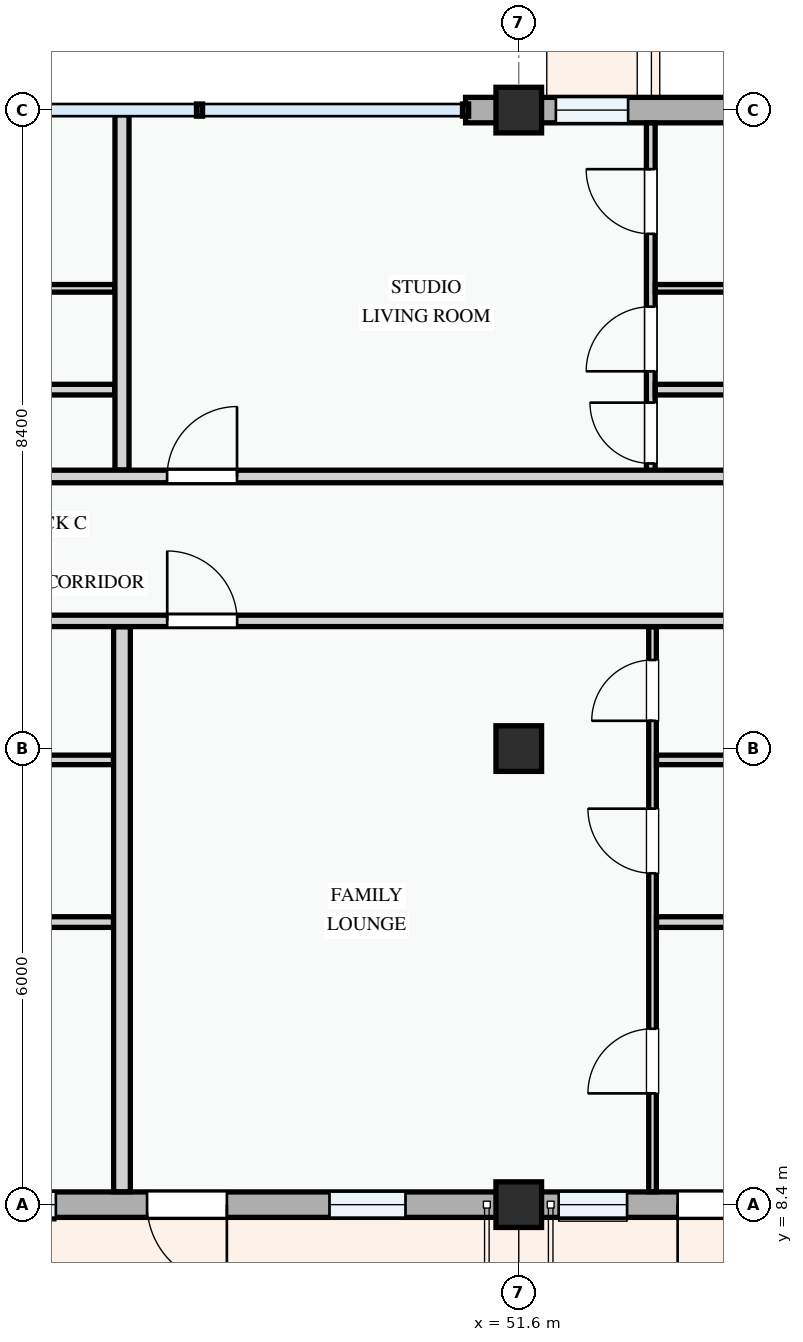
"""IFC4 building model, lengths in metres.
Left out: names, types, materials, properties, quantities, classifications, styles, units other than length and angle.
Written with IfcOpenShell. Run it as: python <this file> out.ifc"""

import sys

from ifc_helpers import new_model, si_unit, direction, frame, frame_2d, origin, origin_2d, place, context, subcontext, project, spatial, rectangle, extrude, element, fill, save


model = new_model("IFC4")
c1 = context("Model", 3, precision=1e-05, world=origin(), true_north=direction((0.0, 1.0)))
c2 = subcontext(c1, "Body", "Model", "MODEL_VIEW")
j1 = project(units=[si_unit("LENGTHUNIT", "METRE"), si_unit("PLANEANGLEUNIT", "RADIAN")], contexts=[c1])
p1 = place(None, origin())
s1 = spatial("IfcSite", under=j1, at=p1, CompositionType="ELEMENT")
p2 = place(p1, origin())
s2 = spatial("IfcBuilding", under=s1, at=p2, CompositionType="ELEMENT")
p3 = place(p2, frame((0.0, 0.0, 11.4)))
s3 = spatial("IfcBuildingStorey", under=s2, at=p3, CompositionType="ELEMENT", Elevation=11.4)
for number, where, z_axis, x_axis in (
    (1, (51.6, 8.4, 0.0), (0.0, 0.0, 1.0), (1.0, 0.0, 0.0)),
    (2, (51.6, 14.4, 0.0), (0.0, 0.0, 1.0), (1.0, 0.0, 0.0)),
    (3, (51.6, 22.8, 0.0), (0.0, 0.0, 1.0), (1.0, 0.0, 0.0)),
):
    element("IfcColumn", number, at=place(p3, frame(where, z_axis=z_axis, x_axis=x_axis)), inside=s3, PredefinedType="COLUMN", context=c2, shape_type="SweptSolid", body=[
        extrude(rectangle(XDim=0.6, YDim=0.6, at=origin_2d()), origin(), (0.0, 0.0, 1.0), 3.3),
    ])
p4 = place(p3, frame((43.2, 8.4, 0.0), z_axis=(0.0, 0.0, 1.0), x_axis=(1.0, 0.0, 0.0)))
e4 = element("IfcWall", 4, at=p4, inside=s3, PredefinedType="STANDARD", context=c2, shape_type="SweptSolid", body=[
    extrude(rectangle(XDim=8.4, YDim=0.335, at=frame_2d((4.2, 0.0))), origin(), (0.0, 0.0, 1.0), 2.375),
])
p5 = place(p4, frame((3.51, 0.0, 0.0)))
e5 = element("IfcOpeningElement", 5, at=p5, cuts=e4, PredefinedType="OPENING", context=c2, shape_type="SweptSolid", body=[
    extrude(rectangle(XDim=1.05, YDim=2.15, at=frame_2d((0.525, 1.075))), frame((0.0, 0.177, 0.0), z_axis=(0.0, -1.0, 0.0), x_axis=(1.0, 0.0, 0.0)), (0.0, 0.0, 1.0), 0.355),
])
p6 = place(p4, frame((1.06, 0.0, 0.78)))
e6 = element("IfcOpeningElement", 6, at=p6, cuts=e4, PredefinedType="OPENING", context=c2, shape_type="SweptSolid", body=[
    extrude(rectangle(XDim=1.25, YDim=1.3, at=frame_2d((0.625, 0.65))), frame((0.0, 0.177, 0.0), z_axis=(0.0, -1.0, 0.0), x_axis=(1.0, 0.0, 0.0)), (0.0, 0.0, 1.0), 0.355),
])
p7 = place(p4, frame((5.91, 0.0, 0.78)))
e7 = element("IfcOpeningElement", 7, at=p7, cuts=e4, PredefinedType="OPENING", context=c2, shape_type="SweptSolid", body=[
    extrude(rectangle(XDim=1.0, YDim=1.25, at=frame_2d((0.5, 0.625))), frame((0.0, 0.177, 0.0), z_axis=(0.0, -1.0, 0.0), x_axis=(1.0, 0.0, 0.0)), (0.0, 0.0, 1.0), 0.355),
])
p8 = place(p3, frame((51.6, 8.4, 0.0), z_axis=(0.0, 0.0, 1.0), x_axis=(1.0, 0.0, 0.0)))
e8 = element("IfcWall", 8, at=p8, inside=s3, PredefinedType="STANDARD", context=c2, shape_type="SweptSolid", body=[
    extrude(rectangle(XDim=6.0, YDim=0.335, at=frame_2d((3.0, 0.0))), origin(), (0.0, 0.0, 1.0), 2.475),
])
p9 = place(p8, frame((2.09, 0.0, 0.0)))
e9 = element("IfcOpeningElement", 9, at=p9, cuts=e8, PredefinedType="OPENING", context=c2, shape_type="SweptSolid", body=[
    extrude(rectangle(XDim=1.1, YDim=2.15, at=frame_2d((0.55, 1.075))), frame((0.0, 0.177, 0.0), z_axis=(0.0, -1.0, 0.0), x_axis=(1.0, 0.0, 0.0)), (0.0, 0.0, 1.0), 0.355),
])
p10 = place(p8, frame((0.525, 0.0, 0.78)))
e10 = element("IfcOpeningElement", 10, at=p10, cuts=e8, PredefinedType="OPENING", context=c2, shape_type="SweptSolid", body=[
    extrude(rectangle(XDim=0.9, YDim=1.2, at=frame_2d((0.45, 0.6))), frame((0.0, 0.177, 0.0), z_axis=(0.0, -1.0, 0.0), x_axis=(1.0, 0.0, 0.0)), (0.0, 0.0, 1.0), 0.355),
])
p11 = place(p8, frame((3.835, 0.0, 0.78)))
e11 = element("IfcOpeningElement", 11, at=p11, cuts=e8, PredefinedType="OPENING", context=c2, shape_type="SweptSolid", body=[
    extrude(rectangle(XDim=1.38, YDim=1.48, at=frame_2d((0.69, 0.74))), frame((0.0, 0.177, 0.0), z_axis=(0.0, -1.0, 0.0), x_axis=(1.0, 0.0, 0.0)), (0.0, 0.0, 1.0), 0.355),
])
p12 = place(p3, frame((57.6, 22.8, 0.0), z_axis=(0.0, 0.0, 1.0), x_axis=(-1.0, 0.0, 0.0)))
e12 = element("IfcWall", 12, at=p12, inside=s3, PredefinedType="STANDARD", context=c2, shape_type="SweptSolid", body=[
    extrude(rectangle(XDim=6.0, YDim=0.335, at=frame_2d((3.0, 0.0))), origin(), (0.0, 0.0, 1.0), 2.475),
])
p13 = place(p12, frame((1.467, 0.0, 0.78)))
e13 = element("IfcOpeningElement", 13, at=p13, cuts=e12, PredefinedType="OPENING", context=c2, shape_type="SweptSolid", body=[
    extrude(rectangle(XDim=1.52, YDim=1.42, at=frame_2d((0.76, 0.71))), frame((0.0, 0.177, 0.0), z_axis=(0.0, -1.0, 0.0), x_axis=(1.0, 0.0, 0.0)), (0.0, 0.0, 1.0), 0.355),
])
p14 = place(p12, frame((4.562, 0.0, 0.78)))
e14 = element("IfcOpeningElement", 14, at=p14, cuts=e12, PredefinedType="OPENING", context=c2, shape_type="SweptSolid", body=[
    extrude(rectangle(XDim=0.95, YDim=1.15, at=frame_2d((0.475, 0.575))), frame((0.0, 0.177, 0.0), z_axis=(0.0, -1.0, 0.0), x_axis=(1.0, 0.0, 0.0)), (0.0, 0.0, 1.0), 0.355),
])
p15 = place(p3, frame((51.6, 22.8, 0.0), z_axis=(0.0, 0.0, 1.0), x_axis=(-1.0, 0.0, 0.0)))
e15 = element("IfcWall", 15, at=p15, inside=s3, PredefinedType="STANDARD", context=c2, shape_type="SweptSolid", body=[
    extrude(rectangle(XDim=0.7, YDim=0.335, at=frame_2d((0.35, 0.0))), origin(), (0.0, 0.0, 1.0), 2.375),
])
p16 = place(p3, frame((40.502, 12.118, 0.0), z_axis=(0.0, 0.0, 1.0), x_axis=(1.0, 0.0, 0.0)))
e16 = element("IfcWall", 16, at=p16, inside=s3, PredefinedType="PARTITIONING", context=c2, shape_type="SweptSolid", body=[
    extrude(rectangle(XDim=5.766, YDim=0.14, at=frame_2d((2.883, 0.0))), origin(), (0.0, 0.0, 1.0), 3.0),
])
p17 = place(p3, frame((40.502, 14.251, 0.0), z_axis=(0.0, 0.0, 1.0), x_axis=(1.0, 0.0, 0.0)))
e17 = element("IfcWall", 17, at=p17, inside=s3, PredefinedType="PARTITIONING", context=c2, shape_type="SweptSolid", body=[
    extrude(rectangle(XDim=5.766, YDim=0.125, at=frame_2d((2.883, 0.0))), origin(), (0.0, 0.0, 1.0), 2.375),
])
p18 = place(p3, frame((40.272, 20.455, 0.0), z_axis=(0.0, 0.0, 1.0), x_axis=(1.0, 0.0, 0.0)))
e18 = element("IfcWall", 18, at=p18, inside=s3, PredefinedType="PARTITIONING", context=c2, shape_type="SweptSolid", body=[
    extrude(rectangle(XDim=6.013, YDim=0.1, at=frame_2d((3.007, 0.0))), origin(), (0.0, 0.0, 1.0), 3.0),
])
p19 = place(p3, frame((40.272, 19.122, 0.0), z_axis=(0.0, 0.0, 1.0), x_axis=(1.0, 0.0, 0.0)))
e19 = element("IfcWall", 19, at=p19, inside=s3, PredefinedType="PARTITIONING", context=c2, shape_type="SweptSolid", body=[
    extrude(rectangle(XDim=6.013, YDim=0.14, at=frame_2d((3.007, 0.0))), origin(), (0.0, 0.0, 1.0), 3.0),
])
p20 = place(p3, frame((53.36, 8.57, 0.0), z_axis=(0.0, 0.0, 1.0), x_axis=(0.0, 1.0, 0.0)))
e20 = element("IfcWall", 20, at=p20, inside=s3, PredefinedType="PARTITIONING", context=c2, shape_type="SweptSolid", body=[
    extrude(rectangle(XDim=7.433, YDim=0.1, at=frame_2d((3.717, 0.0))), origin(), (0.0, 0.0, 1.0), 3.0),
])
p21 = place(p20, frame((1.294, 0.0, 0.0)))
e21 = element("IfcOpeningElement", 21, at=p21, cuts=e20, PredefinedType="OPENING", context=c2, shape_type="SweptSolid", body=[
    extrude(rectangle(XDim=0.85, YDim=2.1, at=frame_2d((0.425, 1.05))), frame((0.0, 0.06, 0.0), z_axis=(0.0, -1.0, 0.0), x_axis=(1.0, 0.0, 0.0)), (0.0, 0.0, 1.0), 0.12),
])
p22 = place(p20, frame((4.19, 0.0, 0.0)))
e22 = element("IfcOpeningElement", 22, at=p22, cuts=e20, PredefinedType="OPENING", context=c2, shape_type="SweptSolid", body=[
    extrude(rectangle(XDim=0.85, YDim=2.1, at=frame_2d((0.425, 1.05))), frame((0.0, 0.06, 0.0), z_axis=(0.0, -1.0, 0.0), x_axis=(1.0, 0.0, 0.0)), (0.0, 0.0, 1.0), 0.12),
])
p23 = place(p20, frame((6.196, 0.0, 0.0)))
e23 = element("IfcOpeningElement", 23, at=p23, cuts=e20, PredefinedType="OPENING", context=c2, shape_type="SweptSolid", body=[
    extrude(rectangle(XDim=0.8, YDim=2.1, at=frame_2d((0.4, 1.05))), frame((0.0, 0.06, 0.0), z_axis=(0.0, -1.0, 0.0), x_axis=(1.0, 0.0, 0.0)), (0.0, 0.0, 1.0), 0.12),
])
p24 = place(p3, frame((53.412, 12.118, 0.0), z_axis=(0.0, 0.0, 1.0), x_axis=(1.0, 0.0, 0.0)))
e24 = element("IfcWall", 24, at=p24, inside=s3, PredefinedType="PARTITIONING", context=c2, shape_type="SweptSolid", body=[
    extrude(rectangle(XDim=4.018, YDim=0.14, at=frame_2d((2.009, 0.0))), origin(), (0.0, 0.0, 1.0), 3.0),
])
p25 = place(p3, frame((53.412, 14.251, 0.0), z_axis=(0.0, 0.0, 1.0), x_axis=(1.0, 0.0, 0.0)))
e25 = element("IfcWall", 25, at=p25, inside=s3, PredefinedType="PARTITIONING", context=c2, shape_type="SweptSolid", body=[
    extrude(rectangle(XDim=4.018, YDim=0.125, at=frame_2d((2.009, 0.0))), origin(), (0.0, 0.0, 1.0), 2.475),
])
p26 = place(p3, frame((53.337, 17.98, 0.0), z_axis=(0.0, 0.0, 1.0), x_axis=(0.0, 1.0, 0.0)))
e26 = element("IfcWall", 26, at=p26, inside=s3, PredefinedType="PARTITIONING", context=c2, shape_type="SweptSolid", body=[
    extrude(rectangle(XDim=4.651, YDim=0.115, at=frame_2d((2.325, 0.0))), origin(), (0.0, 0.0, 1.0), 3.0),
])
p27 = place(p26, frame((0.171, 0.0, 0.0)))
e27 = element("IfcOpeningElement", 27, at=p27, cuts=e26, PredefinedType="OPENING", context=c2, shape_type="SweptSolid", body=[
    extrude(rectangle(XDim=0.8, YDim=2.1, at=frame_2d((0.4, 1.05))), frame((0.0, 0.067, 0.0), z_axis=(0.0, -1.0, 0.0), x_axis=(1.0, 0.0, 0.0)), (0.0, 0.0, 1.0), 0.135),
])
p28 = place(p26, frame((1.384, 0.0, 0.0)))
e28 = element("IfcOpeningElement", 28, at=p28, cuts=e26, PredefinedType="OPENING", context=c2, shape_type="SweptSolid", body=[
    extrude(rectangle(XDim=0.85, YDim=2.1, at=frame_2d((0.425, 1.05))), frame((0.0, 0.067, 0.0), z_axis=(0.0, -1.0, 0.0), x_axis=(1.0, 0.0, 0.0)), (0.0, 0.0, 1.0), 0.135),
])
p29 = place(p26, frame((3.193, 0.0, 0.0)))
e29 = element("IfcOpeningElement", 29, at=p29, cuts=e26, PredefinedType="OPENING", context=c2, shape_type="SweptSolid", body=[
    extrude(rectangle(XDim=0.85, YDim=2.1, at=frame_2d((0.425, 1.05))), frame((0.0, 0.067, 0.0), z_axis=(0.0, -1.0, 0.0), x_axis=(1.0, 0.0, 0.0)), (0.0, 0.0, 1.0), 0.135),
])
p30 = place(p3, frame((53.396, 20.455, 0.0), z_axis=(0.0, 0.0, 1.0), x_axis=(1.0, 0.0, 0.0)))
e30 = element("IfcWall", 30, at=p30, inside=s3, PredefinedType="PARTITIONING", context=c2, shape_type="SweptSolid", body=[
    extrude(rectangle(XDim=4.144, YDim=0.1, at=frame_2d((2.072, 0.0))), origin(), (0.0, 0.0, 1.0), 3.0),
])
p31 = place(p3, frame((53.396, 19.122, 0.0), z_axis=(0.0, 0.0, 1.0), x_axis=(1.0, 0.0, 0.0)))
e31 = element("IfcWall", 31, at=p31, inside=s3, PredefinedType="PARTITIONING", context=c2, shape_type="SweptSolid", body=[
    extrude(rectangle(XDim=4.144, YDim=0.14, at=frame_2d((2.072, 0.0))), origin(), (0.0, 0.0, 1.0), 3.0),
])
p32 = place(p3, frame((46.38, 8.57, 0.0), z_axis=(0.0, 0.0, 1.0), x_axis=(0.0, 1.0, 0.0)))
e32 = element("IfcWall", 32, at=p32, inside=s3, PredefinedType="PARTITIONING", context=c2, shape_type="SweptSolid", body=[
    extrude(rectangle(XDim=7.433, YDim=0.22, at=frame_2d((3.717, 0.0))), origin(), (0.0, 0.0, 1.0), 3.0),
])
p33 = place(p3, frame((46.38, 18.064, 0.0), z_axis=(0.0, 0.0, 1.0), x_axis=(0.0, 1.0, 0.0)))
e33 = element("IfcWall", 33, at=p33, inside=s3, PredefinedType="PARTITIONING", context=c2, shape_type="SweptSolid", body=[
    extrude(rectangle(XDim=4.676, YDim=0.185, at=frame_2d((2.338, 0.0))), origin(), (0.0, 0.0, 1.0), 3.0),
])
p34 = place(p3, frame((22.66, 16.08, 0.0), z_axis=(0.0, 0.0, 1.0), x_axis=(1.0, 0.0, 0.0)))
e34 = element("IfcWall", 34, at=p34, inside=s3, PredefinedType="PARTITIONING", context=c2, shape_type="SweptSolid", body=[
    extrude(rectangle(XDim=34.88, YDim=0.15, at=frame_2d((17.44, 0.0))), origin(), (0.0, 0.0, 1.0), 3.0),
])
p35 = place(p34, frame((2.672, 0.0, 0.0)))
e35 = element("IfcOpeningElement", 35, at=p35, cuts=e34, PredefinedType="OPENING", context=c2, shape_type="SweptSolid", body=[
    extrude(rectangle(XDim=0.92, YDim=2.1, at=frame_2d((0.46, 1.05))), frame((0.0, 0.085, 0.0), z_axis=(0.0, -1.0, 0.0), x_axis=(1.0, 0.0, 0.0)), (0.0, 0.0, 1.0), 0.17),
])
p36 = place(p34, frame((16.58, 0.0, 0.0)))
e36 = element("IfcOpeningElement", 36, at=p36, cuts=e34, PredefinedType="OPENING", context=c2, shape_type="SweptSolid", body=[
    extrude(rectangle(XDim=0.92, YDim=2.1, at=frame_2d((0.46, 1.05))), frame((0.0, 0.085, 0.0), z_axis=(0.0, -1.0, 0.0), x_axis=(1.0, 0.0, 0.0)), (0.0, 0.0, 1.0), 0.17),
])
p37 = place(p34, frame((24.315, 0.0, 0.0)))
e37 = element("IfcOpeningElement", 37, at=p37, cuts=e34, PredefinedType="OPENING", context=c2, shape_type="SweptSolid", body=[
    extrude(rectangle(XDim=0.92, YDim=2.1, at=frame_2d((0.46, 1.05))), frame((0.0, 0.085, 0.0), z_axis=(0.0, -1.0, 0.0), x_axis=(1.0, 0.0, 0.0)), (0.0, 0.0, 1.0), 0.17),
])
p38 = place(p3, frame((22.66, 17.98, 0.0), z_axis=(0.0, 0.0, 1.0), x_axis=(1.0, 0.0, 0.0)))
e38 = element("IfcWall", 38, at=p38, inside=s3, PredefinedType="PARTITIONING", context=c2, shape_type="SweptSolid", body=[
    extrude(rectangle(XDim=34.88, YDim=0.165, at=frame_2d((17.44, 0.0))), origin(), (0.0, 0.0, 1.0), 3.0),
])
p39 = place(p38, frame((2.633, 0.0, 0.0)))
e39 = element("IfcOpeningElement", 39, at=p39, cuts=e38, PredefinedType="OPENING", context=c2, shape_type="SweptSolid", body=[
    extrude(rectangle(XDim=0.96, YDim=2.12, at=frame_2d((0.48, 1.06))), frame((0.0, 0.093, 0.0), z_axis=(0.0, -1.0, 0.0), x_axis=(1.0, 0.0, 0.0)), (0.0, 0.0, 1.0), 0.185),
])
p40 = place(p38, frame((16.343, 0.0, 0.0)))
e40 = element("IfcOpeningElement", 40, at=p40, cuts=e38, PredefinedType="OPENING", context=c2, shape_type="SweptSolid", body=[
    extrude(rectangle(XDim=0.92, YDim=2.1, at=frame_2d((0.46, 1.05))), frame((0.0, 0.093, 0.0), z_axis=(0.0, -1.0, 0.0), x_axis=(1.0, 0.0, 0.0)), (0.0, 0.0, 1.0), 0.185),
])
p41 = place(p38, frame((24.313, 0.0, 0.0)))
e41 = element("IfcOpeningElement", 41, at=p41, cuts=e38, PredefinedType="OPENING", context=c2, shape_type="SweptSolid", body=[
    extrude(rectangle(XDim=0.92, YDim=2.1, at=frame_2d((0.46, 1.05))), frame((0.0, 0.093, 0.0), z_axis=(0.0, -1.0, 0.0), x_axis=(1.0, 0.0, 0.0)), (0.0, 0.0, 1.0), 0.185),
])
p42 = place(p5, frame((1.05, 0.0, 0.0), z_axis=(0.0, 0.0, 1.0), x_axis=(-1.0, 0.0, 0.0)))
e42 = element("IfcDoor", 42, at=p42, inside=s3, OperationType="SINGLE_SWING_LEFT", PredefinedType="DOOR", context=c2, shape_type="SweptSolid", body=[
    extrude(rectangle(XDim=1.05, YDim=2.15, at=frame_2d((0.525, 1.075))), frame((0.0, 0.025, 0.0), z_axis=(0.0, -1.0, 0.0), x_axis=(1.0, 0.0, 0.0)), (0.0, 0.0, 1.0), 0.05),
])
fill(e5, e42)
p43 = place(p6, origin())
e43 = element("IfcWindow", 43, at=p43, inside=s3, PartitioningType="SINGLE_PANEL", PredefinedType="WINDOW", context=c2, shape_type="SweptSolid", body=[
    extrude(rectangle(XDim=1.25, YDim=1.3, at=frame_2d((0.625, 0.65))), frame((0.0, 0.03, 0.0), z_axis=(0.0, -1.0, 0.0), x_axis=(1.0, 0.0, 0.0)), (0.0, 0.0, 1.0), 0.06),
])
fill(e6, e43)
p44 = place(p7, origin())
e44 = element("IfcWindow", 44, at=p44, inside=s3, PartitioningType="SINGLE_PANEL", PredefinedType="WINDOW", context=c2, shape_type="SweptSolid", body=[
    extrude(rectangle(XDim=1.0, YDim=1.25, at=frame_2d((0.5, 0.625))), frame((0.0, 0.03, 0.0), z_axis=(0.0, -1.0, 0.0), x_axis=(1.0, 0.0, 0.0)), (0.0, 0.0, 1.0), 0.06),
])
fill(e7, e44)
p45 = place(p9, frame((1.1, 0.0, 0.0), z_axis=(0.0, 0.0, 1.0), x_axis=(-1.0, 0.0, 0.0)))
e45 = element("IfcDoor", 45, at=p45, inside=s3, OperationType="SINGLE_SWING_RIGHT", PredefinedType="DOOR", context=c2, shape_type="SweptSolid", body=[
    extrude(rectangle(XDim=1.1, YDim=2.15, at=frame_2d((0.55, 1.075))), frame((0.0, 0.025, 0.0), z_axis=(0.0, -1.0, 0.0), x_axis=(1.0, 0.0, 0.0)), (0.0, 0.0, 1.0), 0.05),
])
fill(e9, e45)
p46 = place(p10, origin())
e46 = element("IfcWindow", 46, at=p46, inside=s3, PartitioningType="SINGLE_PANEL", PredefinedType="WINDOW", context=c2, shape_type="SweptSolid", body=[
    extrude(rectangle(XDim=0.9, YDim=1.2, at=frame_2d((0.45, 0.6))), frame((0.0, 0.03, 0.0), z_axis=(0.0, -1.0, 0.0), x_axis=(1.0, 0.0, 0.0)), (0.0, 0.0, 1.0), 0.06),
])
fill(e10, e46)
p47 = place(p14, origin())
e47 = element("IfcWindow", 47, at=p47, inside=s3, PartitioningType="SINGLE_PANEL", PredefinedType="WINDOW", context=c2, shape_type="SweptSolid", body=[
    extrude(rectangle(XDim=0.95, YDim=1.15, at=frame_2d((0.475, 0.575))), frame((0.0, 0.03, 0.0), z_axis=(0.0, -1.0, 0.0), x_axis=(1.0, 0.0, 0.0)), (0.0, 0.0, 1.0), 0.06),
])
fill(e14, e47)
p48 = place(p21, origin())
e48 = element("IfcDoor", 48, at=p48, inside=s3, OperationType="SINGLE_SWING_LEFT", PredefinedType="DOOR", context=c2, shape_type="SweptSolid", body=[
    extrude(rectangle(XDim=0.85, YDim=2.1, at=frame_2d((0.425, 1.05))), frame((0.0, 0.025, 0.0), z_axis=(0.0, -1.0, 0.0), x_axis=(1.0, 0.0, 0.0)), (0.0, 0.0, 1.0), 0.05),
])
fill(e21, e48)
p49 = place(p22, origin())
e49 = element("IfcDoor", 49, at=p49, inside=s3, OperationType="SINGLE_SWING_RIGHT", PredefinedType="DOOR", context=c2, shape_type="SweptSolid", body=[
    extrude(rectangle(XDim=0.85, YDim=2.1, at=frame_2d((0.425, 1.05))), frame((0.0, 0.025, 0.0), z_axis=(0.0, -1.0, 0.0), x_axis=(1.0, 0.0, 0.0)), (0.0, 0.0, 1.0), 0.05),
])
fill(e22, e49)
p50 = place(p23, origin())
e50 = element("IfcDoor", 50, at=p50, inside=s3, OperationType="SINGLE_SWING_LEFT", PredefinedType="DOOR", context=c2, shape_type="SweptSolid", body=[
    extrude(rectangle(XDim=0.8, YDim=2.1, at=frame_2d((0.4, 1.05))), frame((0.0, 0.025, 0.0), z_axis=(0.0, -1.0, 0.0), x_axis=(1.0, 0.0, 0.0)), (0.0, 0.0, 1.0), 0.05),
])
fill(e23, e50)
p51 = place(p27, origin())
e51 = element("IfcDoor", 51, at=p51, inside=s3, OperationType="SINGLE_SWING_RIGHT", PredefinedType="DOOR", context=c2, shape_type="SweptSolid", body=[
    extrude(rectangle(XDim=0.8, YDim=2.1, at=frame_2d((0.4, 1.05))), frame((0.0, 0.025, 0.0), z_axis=(0.0, -1.0, 0.0), x_axis=(1.0, 0.0, 0.0)), (0.0, 0.0, 1.0), 0.05),
])
fill(e27, e51)
p52 = place(p28, origin())
e52 = element("IfcDoor", 52, at=p52, inside=s3, OperationType="SINGLE_SWING_LEFT", PredefinedType="DOOR", context=c2, shape_type="SweptSolid", body=[
    extrude(rectangle(XDim=0.85, YDim=2.1, at=frame_2d((0.425, 1.05))), frame((0.0, 0.025, 0.0), z_axis=(0.0, -1.0, 0.0), x_axis=(1.0, 0.0, 0.0)), (0.0, 0.0, 1.0), 0.05),
])
fill(e28, e52)
p53 = place(p29, origin())
e53 = element("IfcDoor", 53, at=p53, inside=s3, OperationType="SINGLE_SWING_RIGHT", PredefinedType="DOOR", context=c2, shape_type="SweptSolid", body=[
    extrude(rectangle(XDim=0.85, YDim=2.1, at=frame_2d((0.425, 1.05))), frame((0.0, 0.025, 0.0), z_axis=(0.0, -1.0, 0.0), x_axis=(1.0, 0.0, 0.0)), (0.0, 0.0, 1.0), 0.05),
])
fill(e29, e53)
p54 = place(p37, origin())
e54 = element("IfcDoor", 54, at=p54, inside=s3, OperationType="SINGLE_SWING_LEFT", PredefinedType="DOOR", context=c2, shape_type="SweptSolid", body=[
    extrude(rectangle(XDim=0.92, YDim=2.1, at=frame_2d((0.46, 1.05))), frame((0.0, 0.025, 0.0), z_axis=(0.0, -1.0, 0.0), x_axis=(1.0, 0.0, 0.0)), (0.0, 0.0, 1.0), 0.05),
])
fill(e37, e54)
p55 = place(p41, origin())
e55 = element("IfcDoor", 55, at=p55, inside=s3, OperationType="SINGLE_SWING_RIGHT", PredefinedType="DOOR", context=c2, shape_type="SweptSolid", body=[
    extrude(rectangle(XDim=0.92, YDim=2.1, at=frame_2d((0.46, 1.05))), frame((0.0, 0.025, 0.0), z_axis=(0.0, -1.0, 0.0), x_axis=(1.0, 0.0, 0.0)), (0.0, 0.0, 1.0), 0.05),
])
fill(e41, e55)
save(model, sys.argv[1])
